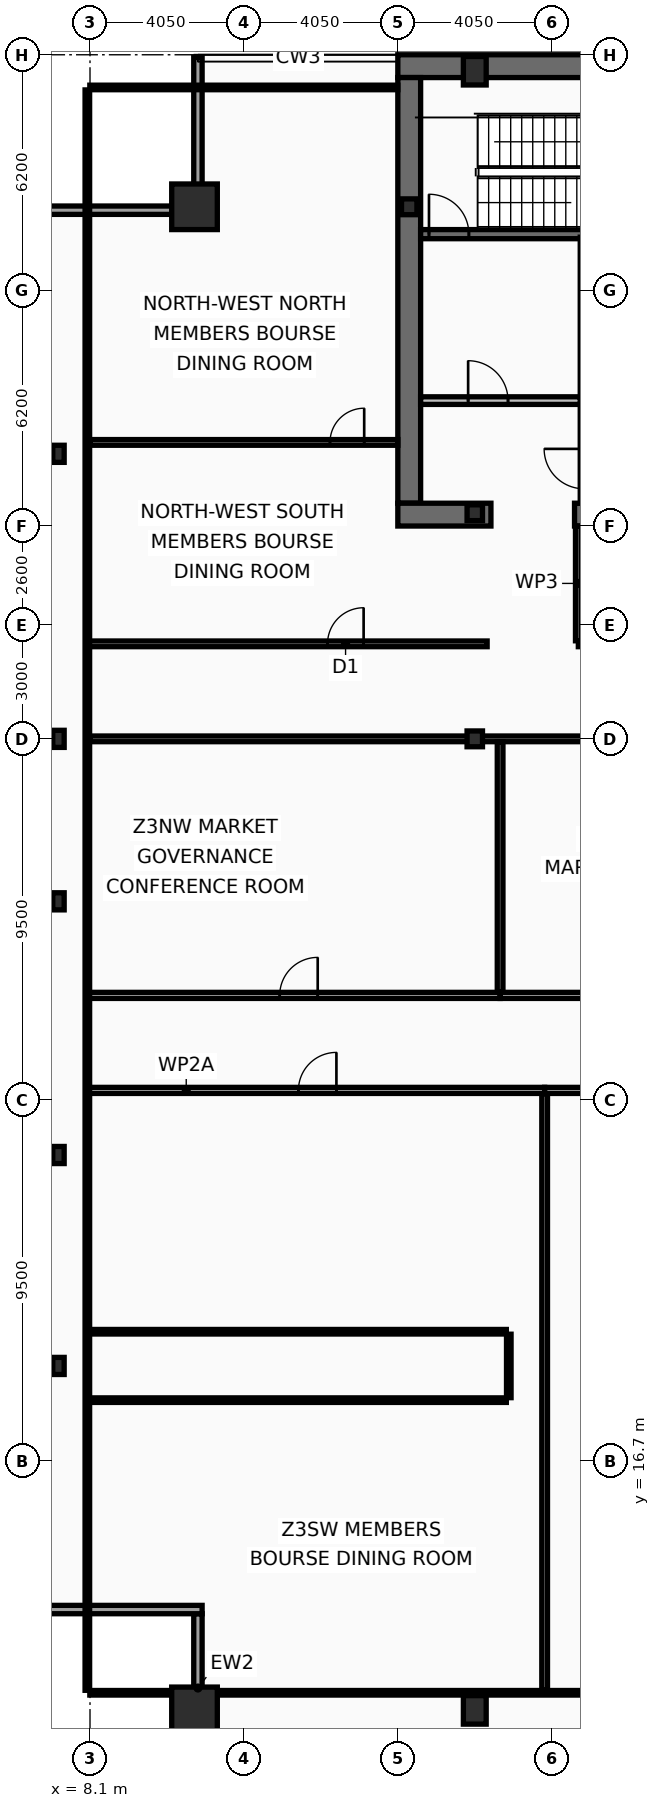
"""IFC4 building model, lengths in metres.
Left out: names, types, materials, properties, quantities, classifications, styles, units other than length and angle.
Written with IfcOpenShell. Run it as: python <this file> out.ifc"""

import sys

from ifc_helpers import new_model, si_unit, direction, frame, frame_2d, origin, origin_2d, place, context, subcontext, project, spatial, rectangle, hollow_rectangle, i_section, extrude, element, fill, save


model = new_model("IFC4")
c1 = context("Model", 3, precision=1e-05, world=origin(), true_north=direction((0.0, 1.0)))
c2 = subcontext(c1, "Body", "Model", "MODEL_VIEW")
j1 = project(units=[si_unit("LENGTHUNIT", "METRE"), si_unit("PLANEANGLEUNIT", "RADIAN")], contexts=[c1])
p1 = place(None, origin())
s1 = spatial("IfcSite", under=j1, at=p1, CompositionType="ELEMENT")
p2 = place(p1, origin())
s2 = spatial("IfcBuilding", under=s1, at=p2, CompositionType="ELEMENT")
p3 = place(p2, frame((0.0, 0.0, 235.4)))
s3 = spatial("IfcBuildingStorey", under=s2, at=p3, CompositionType="ELEMENT", Elevation=235.4)
p4 = place(p3, frame((16.2, 53.4, 0.0), z_axis=(0.0, 0.0, 1.0), x_axis=(1.0, 0.0, 0.0)))
e1 = element("IfcWall", 1, at=p4, inside=s3, PredefinedType="SHEAR", context=c2, shape_type="SweptSolid", body=[
    extrude(rectangle(XDim=40.5, YDim=0.6, at=frame_2d((20.25, 0.0))), origin(), (0.0, 0.0, 1.0), 3.44),
])
p5 = place(p3, frame((16.5, 41.9, 0.0), z_axis=(0.0, 0.0, 1.0), x_axis=(0.0, 1.0, 0.0)))
e2 = element("IfcWall", 2, at=p5, inside=s3, PredefinedType="SHEAR", context=c2, shape_type="SweptSolid", body=[
    extrude(rectangle(XDim=11.2, YDim=0.6, at=frame_2d((5.6, 0.0))), origin(), (0.0, 0.0, 1.0), 3.44),
])
p6 = place(p3, frame((18.65, 41.6, 0.0), z_axis=(0.0, 0.0, 1.0), x_axis=(-1.0, 0.0, 0.0)))
e3 = element("IfcWall", 3, at=p6, inside=s3, PredefinedType="SHEAR", context=c2, shape_type="SweptSolid", body=[
    extrude(rectangle(XDim=2.45, YDim=0.6, at=frame_2d((1.225, 0.0))), origin(), (0.0, 0.0, 1.0), 3.44),
])
p7 = place(p3, frame((32.3, 41.6, 0.0), z_axis=(0.0, 0.0, 1.0), x_axis=(-1.0, 0.0, 0.0)))
e4 = element("IfcWall", 4, at=p7, inside=s3, PredefinedType="SHEAR", context=c2, shape_type="SweptSolid", body=[
    extrude(rectangle(XDim=11.45, YDim=0.6, at=frame_2d((5.725, 0.0))), origin(), (0.0, 0.0, 1.0), 3.44),
])
p8 = place(p3, frame((16.8, 48.98, 0.0), z_axis=(0.0, 0.0, 1.0), x_axis=(1.0, 0.0, 0.0)))
e5 = element("IfcWall", 5, at=p8, inside=s3, PredefinedType="SHEAR", context=c2, shape_type="SweptSolid", body=[
    extrude(rectangle(XDim=7.42, YDim=0.24, at=frame_2d((3.71, 0.0))), origin(), (0.0, 0.0, 1.0), 3.44),
])
p9 = place(p8, frame((0.22, 0.0, 0.0)))
e6 = element("IfcOpeningElement", 6, at=p9, cuts=e5, PredefinedType="OPENING", context=c2, shape_type="SweptSolid", body=[
    extrude(rectangle(XDim=1.05, YDim=2.15, at=frame_2d((0.525, 1.075))), frame((0.0, 0.13, 0.0), z_axis=(0.0, -1.0, 0.0), x_axis=(1.0, 0.0, 0.0)), (0.0, 0.0, 1.0), 0.26),
])
for number, where, z_axis, x_axis in (
    (7, (10.85, 10.15, 0.0), (0.0, 0.0, 1.0), (1.0, 0.0, 0.0)),
    (8, (10.85, 49.7, 0.0), (0.0, 0.0, 1.0), (1.0, 0.0, 0.0)),
):
    element("IfcColumn", number, at=place(p3, frame(where, z_axis=z_axis, x_axis=x_axis)), inside=s3, PredefinedType="COLUMN", context=c2, shape_type="SweptSolid", body=[
        extrude(hollow_rectangle(XDim=1.2, YDim=1.2, WallThickness=0.06, at=origin_2d()), origin(), (0.0, 0.0, 1.0), 3.6),
    ])
for number, where, z_axis, x_axis in (
    (9, (18.225, 10.15, 0.0), (0.0, 0.0, 1.0), (1.0, 0.0, 0.0)),
    (10, (18.225, 53.28, 0.0), (0.0, 0.0, 1.0), (1.0, 0.0, 0.0)),
):
    element("IfcColumn", number, at=place(p3, frame(where, z_axis=z_axis, x_axis=x_axis)), inside=s3, PredefinedType="COLUMN", context=c2, shape_type="SweptSolid", body=[
        extrude(hollow_rectangle(XDim=0.6, YDim=0.75, WallThickness=0.045, at=origin_2d()), origin(), (0.0, 0.0, 1.0), 3.6),
    ])
for number, where, z_axis, x_axis in (
    (11, (7.27, 19.2, 0.0), (0.0, 0.0, 1.0), (1.0, 0.0, 0.0)),
    (12, (7.27, 24.75, 0.0), (0.0, 0.0, 1.0), (1.0, 0.0, 0.0)),
    (13, (7.27, 31.425, 0.0), (0.0, 0.0, 1.0), (1.0, 0.0, 0.0)),
    (14, (7.27, 35.7, 0.0), (0.0, 0.0, 1.0), (1.0, 0.0, 0.0)),
    (15, (7.27, 43.2, 0.0), (0.0, 0.0, 1.0), (1.0, 0.0, 0.0)),
):
    element("IfcColumn", number, at=place(p3, frame(where, z_axis=z_axis, x_axis=x_axis)), inside=s3, PredefinedType="COLUMN", context=c2, shape_type="SweptSolid", body=[
        extrude(i_section(OverallWidth=0.3, OverallDepth=0.45, WebThickness=0.014, FlangeThickness=0.026, at=origin_2d()), origin(), (0.0, 0.0, 1.0), 3.6),
    ])
for number, where, z_axis, x_axis in (
    (16, (16.5, 49.7, 0.0), (0.0, 0.0, 1.0), (1.0, 0.0, 0.0)),
    (17, (18.225, 35.7, 0.0), (0.0, 0.0, 1.0), (1.0, 0.0, 0.0)),
    (18, (18.225, 41.65, 0.0), (0.0, 0.0, 1.0), (1.0, 0.0, 0.0)),
):
    element("IfcColumn", number, at=place(p3, frame(where, z_axis=z_axis, x_axis=x_axis)), inside=s3, PredefinedType="COLUMN", context=c2, shape_type="SweptSolid", body=[
        extrude(i_section(OverallWidth=0.406, OverallDepth=0.416, WebThickness=0.03, FlangeThickness=0.048, at=origin_2d()), origin(), (0.0, 0.0, 1.0), 3.6),
    ])
p10 = place(p3, frame((10.94, 8.77, 0.0), z_axis=(0.0, 0.0, 1.0), x_axis=(0.0, 1.0, 0.0)))
e19 = element("IfcWall", 19, at=p10, inside=s3, PredefinedType="SOLIDWALL", context=c2, shape_type="SweptSolid", body=[
    extrude(rectangle(XDim=3.91, YDim=0.22, at=frame_2d((1.955, 0.0))), origin(), (0.0, 0.0, 1.0), 2.09),
])
p11 = place(p3, frame((11.05, 12.79, 0.0), z_axis=(0.0, 0.0, 1.0), x_axis=(-1.0, 0.0, 0.0)))
e20 = element("IfcWall", 20, at=p11, inside=s3, PredefinedType="SOLIDWALL", context=c2, shape_type="SweptSolid", body=[
    extrude(rectangle(XDim=4.13, YDim=0.22, at=frame_2d((2.065, 0.0))), origin(), (0.0, 0.0, 1.0), 2.83),
])
p12 = place(p3, frame((6.92, 49.61, 0.0), z_axis=(0.0, 0.0, 1.0), x_axis=(1.0, 0.0, 0.0)))
e21 = element("IfcWall", 21, at=p12, inside=s3, PredefinedType="SOLIDWALL", context=c2, shape_type="SweptSolid", body=[
    extrude(rectangle(XDim=4.13, YDim=0.22, at=frame_2d((2.065, 0.0))), origin(), (0.0, 0.0, 1.0), 2.09),
])
p13 = place(p3, frame((10.94, 49.72, 0.0), z_axis=(0.0, 0.0, 1.0), x_axis=(0.0, 1.0, 0.0)))
e22 = element("IfcWall", 22, at=p13, inside=s3, PredefinedType="SOLIDWALL", context=c2, shape_type="SweptSolid", body=[
    extrude(rectangle(XDim=3.91, YDim=0.22, at=frame_2d((1.955, 0.0))), origin(), (0.0, 0.0, 1.0), 2.09),
])
p14 = place(p3, frame((16.8, 44.6, 0.0), z_axis=(0.0, 0.0, 1.0), x_axis=(1.0, 0.0, 0.0)))
e23 = element("IfcWall", 23, at=p14, inside=s3, PredefinedType="PARTITIONING", context=c2, shape_type="SweptSolid", body=[
    extrude(rectangle(XDim=4.2, YDim=0.2, at=frame_2d((2.1, 0.0))), origin(), (0.0, 0.0, 1.0), 3.44),
])
p15 = place(p14, frame((1.25, 0.0, 0.0)))
e24 = element("IfcOpeningElement", 24, at=p15, cuts=e23, PredefinedType="OPENING", context=c2, shape_type="SweptSolid", body=[
    extrude(rectangle(XDim=1.05, YDim=2.15, at=frame_2d((0.525, 1.075))), frame((0.0, 0.11, 0.0), z_axis=(0.0, -1.0, 0.0), x_axis=(1.0, 0.0, 0.0)), (0.0, 0.0, 1.0), 0.22),
])
p16 = place(p3, frame((20.95, 38.2, 0.0), z_axis=(0.0, 0.0, 1.0), x_axis=(1.0, 0.0, 0.0)))
e25 = element("IfcWall", 25, at=p16, inside=s3, PredefinedType="PARTITIONING", context=c2, shape_type="SweptSolid", body=[
    extrude(rectangle(XDim=4.15, YDim=0.15, at=frame_2d((2.075, 0.0))), origin(), (0.0, 0.0, 1.0), 2.78),
])
p17 = place(p16, frame((0.9, 0.0, 0.0)))
e26 = element("IfcOpeningElement", 26, at=p17, cuts=e25, PredefinedType="OPENING", context=c2, shape_type="SweptSolid", body=[
    extrude(rectangle(XDim=0.95, YDim=2.05, at=frame_2d((0.475, 1.025))), frame((0.0, 0.085, 0.0), z_axis=(0.0, -1.0, 0.0), x_axis=(1.0, 0.0, 0.0)), (0.0, 0.0, 1.0), 0.17),
])
p18 = place(p3, frame((20.95, 38.28, 0.0), z_axis=(0.0, 0.0, 1.0), x_axis=(0.0, 1.0, 0.0)))
e27 = element("IfcWall", 27, at=p18, inside=s3, PredefinedType="PARTITIONING", context=c2, shape_type="SweptSolid", body=[
    extrude(rectangle(XDim=3.02, YDim=0.15, at=frame_2d((1.51, 0.0))), origin(), (0.0, 0.0, 1.0), 3.44),
])
p19 = place(p3, frame((8.03, 38.2, 0.0), z_axis=(0.0, 0.0, 1.0), x_axis=(1.0, 0.0, 0.0)))
e28 = element("IfcWall", 28, at=p19, inside=s3, PredefinedType="PARTITIONING", context=c2, shape_type="SweptSolid", body=[
    extrude(rectangle(XDim=10.52, YDim=0.15, at=frame_2d((5.26, 0.0))), origin(), (0.0, 0.0, 1.0), 2.78),
])
p20 = place(p19, frame((6.32, 0.0, 0.0)))
e29 = element("IfcOpeningElement", 29, at=p20, cuts=e28, PredefinedType="OPENING", context=c2, shape_type="SweptSolid", body=[
    extrude(rectangle(XDim=0.95, YDim=2.05, at=frame_2d((0.475, 1.025))), frame((0.0, 0.085, 0.0), z_axis=(0.0, -1.0, 0.0), x_axis=(1.0, 0.0, 0.0)), (0.0, 0.0, 1.0), 0.17),
])
p21 = place(p3, frame((8.095, 43.5, 0.0), z_axis=(0.0, 0.0, 1.0), x_axis=(1.0, 0.0, 0.0)))
e30 = element("IfcWall", 30, at=p21, inside=s3, PredefinedType="PARTITIONING", context=c2, shape_type="SweptSolid", body=[
    extrude(rectangle(XDim=8.105, YDim=0.15, at=frame_2d((4.052, 0.0))), origin(), (0.0, 0.0, 1.0), 2.09),
])
p22 = place(p21, frame((6.32, 0.0, 0.0)))
e31 = element("IfcOpeningElement", 31, at=p22, cuts=e30, PredefinedType="OPENING", context=c2, shape_type="SweptSolid", body=[
    extrude(rectangle(XDim=0.9, YDim=2.05, at=frame_2d((0.45, 1.025))), frame((0.0, 0.085, 0.0), z_axis=(0.0, -1.0, 0.0), x_axis=(1.0, 0.0, 0.0)), (0.0, 0.0, 1.0), 0.17),
])
p23 = place(p3, frame((8.095, 35.7, 0.0), z_axis=(0.0, 0.0, 1.0), x_axis=(1.0, 0.0, 0.0)))
e32 = element("IfcWall", 32, at=p23, inside=s3, PredefinedType="PARTITIONING", context=c2, shape_type="SweptSolid", body=[
    extrude(rectangle(XDim=24.925, YDim=0.15, at=frame_2d((12.462, 0.0))), origin(), (0.0, 0.0, 1.0), 2.09),
])
p24 = place(p3, frame((8.03, 26.45, 0.0), z_axis=(0.0, 0.0, 1.0), x_axis=(1.0, 0.0, 0.0)))
e33 = element("IfcWall", 33, at=p24, inside=s3, PredefinedType="PARTITIONING", context=c2, shape_type="SweptSolid", body=[
    extrude(rectangle(XDim=12.034, YDim=0.16, at=frame_2d((6.017, 0.0))), origin(), (0.0, 0.0, 1.0), 2.53),
])
p25 = place(p24, frame((5.554, 0.0, 0.0)))
e34 = element("IfcOpeningElement", 34, at=p25, cuts=e33, PredefinedType="OPENING", context=c2, shape_type="SweptSolid", body=[
    extrude(rectangle(XDim=1.0, YDim=2.05, at=frame_2d((0.5, 1.025))), frame((0.0, 0.09, 0.0), z_axis=(0.0, -1.0, 0.0), x_axis=(1.0, 0.0, 0.0)), (0.0, 0.0, 1.0), 0.18),
])
p26 = place(p3, frame((20.064, 26.45, 0.0), z_axis=(0.0, 0.0, 1.0), x_axis=(1.0, 0.0, 0.0)))
e35 = element("IfcWall", 35, at=p26, inside=s3, PredefinedType="PARTITIONING", context=c2, shape_type="SweptSolid", body=[
    extrude(rectangle(XDim=6.518, YDim=0.16, at=frame_2d((3.259, 0.0))), origin(), (0.0, 0.0, 1.0), 2.78),
])
p27 = place(p26, frame((3.238, 0.0, 0.0)))
e36 = element("IfcOpeningElement", 36, at=p27, cuts=e35, PredefinedType="OPENING", context=c2, shape_type="SweptSolid", body=[
    extrude(rectangle(XDim=1.0, YDim=2.05, at=frame_2d((0.5, 1.025))), frame((0.0, 0.09, 0.0), z_axis=(0.0, -1.0, 0.0), x_axis=(1.0, 0.0, 0.0)), (0.0, 0.0, 1.0), 0.18),
])
p28 = place(p3, frame((20.064, 10.665, 0.0), z_axis=(0.0, 0.0, 1.0), x_axis=(0.0, 1.0, 0.0)))
e37 = element("IfcWall", 37, at=p28, inside=s3, PredefinedType="PARTITIONING", context=c2, shape_type="SweptSolid", body=[
    extrude(rectangle(XDim=15.7, YDim=0.15, at=frame_2d((7.85, 0.0))), origin(), (0.0, 0.0, 1.0), 2.98),
])
p29 = place(p3, frame((8.03, 28.95, 0.0), z_axis=(0.0, 0.0, 1.0), x_axis=(1.0, 0.0, 0.0)))
e38 = element("IfcWall", 38, at=p29, inside=s3, PredefinedType="PARTITIONING", context=c2, shape_type="SweptSolid", body=[
    extrude(rectangle(XDim=10.862, YDim=0.16, at=frame_2d((5.431, 0.0))), origin(), (0.0, 0.0, 1.0), 2.53),
])
p30 = place(p29, frame((5.062, 0.0, 0.0)))
e39 = element("IfcOpeningElement", 39, at=p30, cuts=e38, PredefinedType="OPENING", context=c2, shape_type="SweptSolid", body=[
    extrude(rectangle(XDim=1.0, YDim=2.05, at=frame_2d((0.5, 1.025))), frame((0.0, 0.09, 0.0), z_axis=(0.0, -1.0, 0.0), x_axis=(1.0, 0.0, 0.0)), (0.0, 0.0, 1.0), 0.18),
])
p31 = place(p3, frame((18.892, 28.95, 0.0), z_axis=(0.0, 0.0, 1.0), x_axis=(1.0, 0.0, 0.0)))
e40 = element("IfcWall", 40, at=p31, inside=s3, PredefinedType="PARTITIONING", context=c2, shape_type="SweptSolid", body=[
    extrude(rectangle(XDim=14.208, YDim=0.16, at=frame_2d((7.104, 0.0))), origin(), (0.0, 0.0, 1.0), 2.78),
])
p32 = place(p31, frame((6.468, 0.0, 0.0)))
e41 = element("IfcOpeningElement", 41, at=p32, cuts=e40, PredefinedType="OPENING", context=c2, shape_type="SweptSolid", body=[
    extrude(rectangle(XDim=1.6, YDim=2.15, at=frame_2d((0.8, 1.075))), frame((0.0, 0.09, 0.0), z_axis=(0.0, -1.0, 0.0), x_axis=(1.0, 0.0, 0.0)), (0.0, 0.0, 1.0), 0.18),
])
p33 = place(p3, frame((18.892, 29.035, 0.0), z_axis=(0.0, 0.0, 1.0), x_axis=(0.0, 1.0, 0.0)))
e42 = element("IfcWall", 42, at=p33, inside=s3, PredefinedType="PARTITIONING", context=c2, shape_type="SweptSolid", body=[
    extrude(rectangle(XDim=6.585, YDim=0.15, at=frame_2d((3.292, 0.0))), origin(), (0.0, 0.0, 1.0), 2.98),
])
p34 = place(p3, frame((8.03, 10.665, 0.0), z_axis=(0.0, 0.0, 1.0), x_axis=(0.0, 1.0, 0.0)))
e43 = element("IfcWall", 43, at=p34, inside=s3, PredefinedType="PARTITIONING", context=c2, shape_type="SweptSolid", body=[
    extrude(rectangle(XDim=42.11, YDim=0.12, at=frame_2d((21.055, 0.0))), origin(), (0.0, 0.0, 1.0), 1.83),
])
p35 = place(p3, frame((8.095, 52.84, 0.0), z_axis=(0.0, 0.0, 1.0), x_axis=(1.0, 0.0, 0.0)))
e44 = element("IfcWall", 44, at=p35, inside=s3, PredefinedType="PARTITIONING", context=c2, shape_type="SweptSolid", body=[
    extrude(rectangle(XDim=8.105, YDim=0.12, at=frame_2d((4.052, 0.0))), origin(), (0.0, 0.0, 1.0), 3.44),
])
p36 = place(p3, frame((8.095, 10.6, 0.0), z_axis=(0.0, 0.0, 1.0), x_axis=(1.0, 0.0, 0.0)))
e45 = element("IfcWall", 45, at=p36, inside=s3, PredefinedType="PARTITIONING", context=c2, shape_type="SweptSolid", body=[
    extrude(rectangle(XDim=56.71, YDim=0.12, at=frame_2d((28.355, 0.0))), origin(), (0.0, 0.0, 1.0), 2.09),
])
for number, where, z_axis, x_axis in (
    (46, (8.095, 18.3, 0.0), (0.0, 0.0, 1.0), (1.0, 0.0, 0.0)),
    (47, (8.095, 20.1, 0.0), (0.0, 0.0, 1.0), (1.0, 0.0, 0.0)),
):
    element("IfcWall", number, at=place(p3, frame(where, z_axis=z_axis, x_axis=x_axis)), inside=s3, PredefinedType="PARTITIONING", context=c2, shape_type="SweptSolid", body=[
        extrude(rectangle(XDim=10.96, YDim=0.12, at=frame_2d((5.48, 0.0))), origin(), (0.0, 0.0, 1.0), 2.53),
    ])
p37 = place(p3, frame((19.12, 18.365, 0.0), z_axis=(0.0, 0.0, 1.0), x_axis=(0.0, 1.0, 0.0)))
e48 = element("IfcWall", 48, at=p37, inside=s3, PredefinedType="PARTITIONING", context=c2, shape_type="SweptSolid", body=[
    extrude(rectangle(XDim=1.67, YDim=0.12, at=frame_2d((0.835, 0.0))), origin(), (0.0, 0.0, 1.0), 3.44),
])
p38 = place(p9, origin())
e49 = element("IfcDoor", 49, at=p38, inside=s3, OperationType="SINGLE_SWING_LEFT", PredefinedType="DOOR", context=c2, shape_type="SweptSolid", body=[
    extrude(rectangle(XDim=1.05, YDim=2.15, at=frame_2d((0.525, 1.075))), frame((0.0, 0.025, 0.0), z_axis=(0.0, -1.0, 0.0), x_axis=(1.0, 0.0, 0.0)), (0.0, 0.0, 1.0), 0.05),
])
fill(e6, e49)
p39 = place(p15, origin())
e50 = element("IfcDoor", 50, at=p39, inside=s3, OperationType="SINGLE_SWING_LEFT", PredefinedType="DOOR", context=c2, shape_type="SweptSolid", body=[
    extrude(rectangle(XDim=1.05, YDim=2.15, at=frame_2d((0.525, 1.075))), frame((0.0, 0.025, 0.0), z_axis=(0.0, -1.0, 0.0), x_axis=(1.0, 0.0, 0.0)), (0.0, 0.0, 1.0), 0.05),
])
fill(e24, e50)
p40 = place(p20, origin())
e51 = element("IfcDoor", 51, at=p40, inside=s3, OperationType="SINGLE_SWING_RIGHT", PredefinedType="DOOR", context=c2, shape_type="SweptSolid", body=[
    extrude(rectangle(XDim=0.95, YDim=2.05, at=frame_2d((0.475, 1.025))), frame((0.0, 0.025, 0.0), z_axis=(0.0, -1.0, 0.0), x_axis=(1.0, 0.0, 0.0)), (0.0, 0.0, 1.0), 0.05),
])
fill(e29, e51)
p41 = place(p22, origin())
e52 = element("IfcDoor", 52, at=p41, inside=s3, OperationType="SINGLE_SWING_RIGHT", PredefinedType="DOOR", context=c2, shape_type="SweptSolid", body=[
    extrude(rectangle(XDim=0.9, YDim=2.05, at=frame_2d((0.45, 1.025))), frame((0.0, 0.025, 0.0), z_axis=(0.0, -1.0, 0.0), x_axis=(1.0, 0.0, 0.0)), (0.0, 0.0, 1.0), 0.05),
])
fill(e31, e52)
p42 = place(p25, origin())
e53 = element("IfcDoor", 53, at=p42, inside=s3, OperationType="SINGLE_SWING_RIGHT", PredefinedType="DOOR", context=c2, shape_type="SweptSolid", body=[
    extrude(rectangle(XDim=1.0, YDim=2.05, at=frame_2d((0.5, 1.025))), frame((0.0, 0.025, 0.0), z_axis=(0.0, -1.0, 0.0), x_axis=(1.0, 0.0, 0.0)), (0.0, 0.0, 1.0), 0.05),
])
fill(e34, e53)
p43 = place(p30, origin())
e54 = element("IfcDoor", 54, at=p43, inside=s3, OperationType="SINGLE_SWING_RIGHT", PredefinedType="DOOR", context=c2, shape_type="SweptSolid", body=[
    extrude(rectangle(XDim=1.0, YDim=2.05, at=frame_2d((0.5, 1.025))), frame((0.0, 0.025, 0.0), z_axis=(0.0, -1.0, 0.0), x_axis=(1.0, 0.0, 0.0)), (0.0, 0.0, 1.0), 0.05),
])
fill(e39, e54)
save(model, sys.argv[1])
